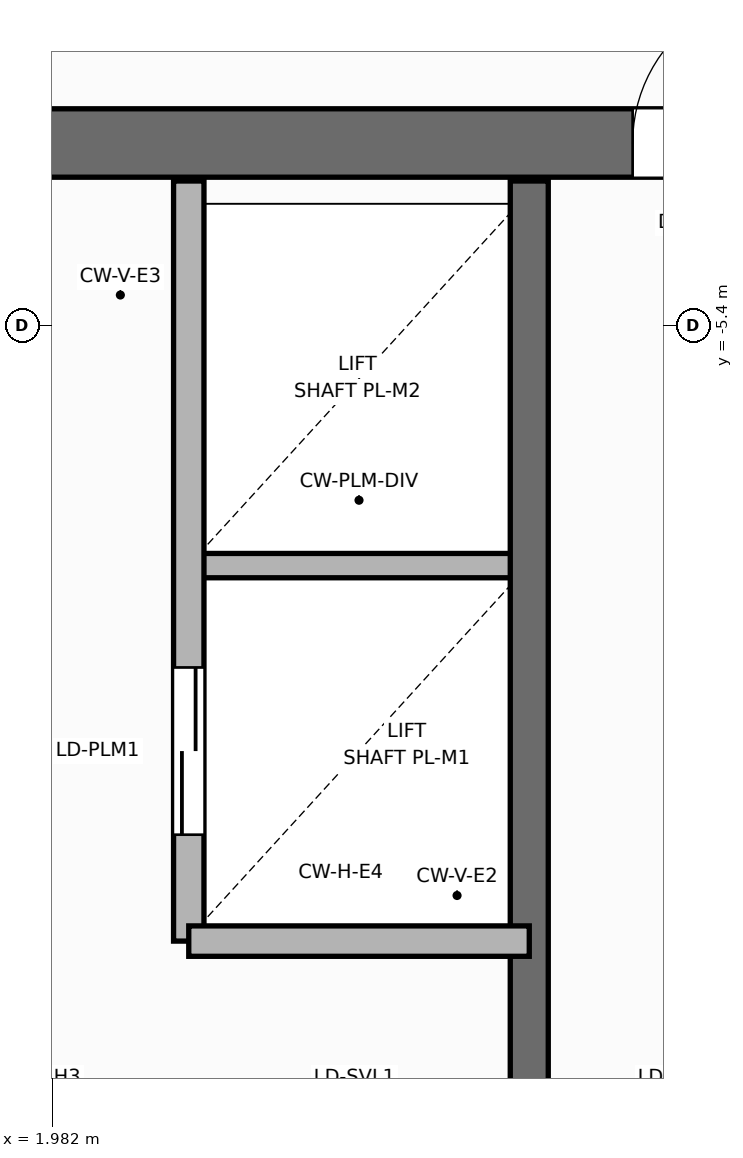
"""IFC4 building model, lengths in metres.
Left out: names, types, materials, properties, quantities, classifications, styles, units other than length and angle.
Written with IfcOpenShell. Run it as: python <this file> out.ifc"""

import sys

from ifc_helpers import new_model, si_unit, direction, frame, frame_2d, origin, place, context, subcontext, project, spatial, rectangle, extrude, element, fill, save


model = new_model("IFC4")
c1 = context("Model", 3, precision=1e-05, world=origin(), true_north=direction((0.0, 1.0)))
c2 = subcontext(c1, "Body", "Model", "MODEL_VIEW")
j1 = project(units=[si_unit("LENGTHUNIT", "METRE"), si_unit("PLANEANGLEUNIT", "RADIAN")], contexts=[c1])
p1 = place(None, origin())
s1 = spatial("IfcSite", under=j1, at=p1, CompositionType="ELEMENT")
p2 = place(p1, origin())
s2 = spatial("IfcBuilding", under=s1, at=p2, CompositionType="ELEMENT")
p3 = place(p2, frame((0.0, 0.0, 90.0)))
s3 = spatial("IfcBuildingStorey", under=s2, at=p3, CompositionType="ELEMENT", Elevation=90.0)
p4 = place(p3, frame((2.88, -6.98, 0.0), z_axis=(0.0, 0.0, 1.0), x_axis=(1.0, 0.0, 0.0)))
e1 = element("IfcWall", 1, at=p4, inside=s3, PredefinedType="PARTITIONING", context=c2, shape_type="SweptSolid", body=[
    extrude(rectangle(XDim=2.24, YDim=0.16, at=frame_2d((1.12, 0.0))), origin(), (0.0, 0.0, 1.0), 4.52),
])
p5 = place(p3, frame((-12.65, -4.2, 0.0), z_axis=(0.0, 0.0, 1.0), x_axis=(1.0, 0.0, 0.0)))
e2 = element("IfcWall", 2, at=p5, inside=s3, PredefinedType="SHEAR", context=c2, shape_type="SweptSolid", body=[
    extrude(rectangle(XDim=25.3, YDim=0.45, at=frame_2d((12.65, 0.0))), origin(), (0.0, 0.0, 1.0), 4.8),
])
p6 = place(p5, frame((0.95, 0.0, 0.0)))
e3 = element("IfcOpeningElement", 3, at=p6, cuts=e2, PredefinedType="OPENING", context=c2, shape_type="SweptSolid", body=[
    extrude(rectangle(XDim=0.756, YDim=2.054, at=frame_2d((0.375, 1.027))), frame((0.0, 0.235, 0.0), z_axis=(0.0, -1.0, 0.0), x_axis=(1.0, 0.0, 0.0)), (0.0, 0.0, 1.0), 0.47),
])
p7 = place(p5, frame((2.6, 0.0, 0.0)))
e4 = element("IfcOpeningElement", 4, at=p7, cuts=e2, PredefinedType="OPENING", context=c2, shape_type="SweptSolid", body=[
    extrude(rectangle(XDim=0.756, YDim=2.054, at=frame_2d((0.375, 1.027))), frame((0.0, 0.235, 0.0), z_axis=(0.0, -1.0, 0.0), x_axis=(1.0, 0.0, 0.0)), (0.0, 0.0, 1.0), 0.47),
])
p8 = place(p5, frame((21.85, 0.0, 0.0)))
e5 = element("IfcOpeningElement", 5, at=p8, cuts=e2, PredefinedType="OPENING", context=c2, shape_type="SweptSolid", body=[
    extrude(rectangle(XDim=0.756, YDim=2.054, at=frame_2d((0.375, 1.027))), frame((0.0, 0.235, 0.0), z_axis=(0.0, -1.0, 0.0), x_axis=(1.0, 0.0, 0.0)), (0.0, 0.0, 1.0), 0.47),
])
p9 = place(p5, frame((23.5, 0.0, 0.0)))
e6 = element("IfcOpeningElement", 6, at=p9, cuts=e2, PredefinedType="OPENING", context=c2, shape_type="SweptSolid", body=[
    extrude(rectangle(XDim=0.756, YDim=2.054, at=frame_2d((0.375, 1.027))), frame((0.0, 0.235, 0.0), z_axis=(0.0, -1.0, 0.0), x_axis=(1.0, 0.0, 0.0)), (0.0, 0.0, 1.0), 0.47),
])
p10 = place(p5, frame((5.85, 0.0, 0.0)))
e7 = element("IfcOpeningElement", 7, at=p10, cuts=e2, PredefinedType="OPENING", context=c2, shape_type="SweptSolid", body=[
    extrude(rectangle(XDim=1.006, YDim=2.104, at=frame_2d((0.5, 1.052))), frame((0.0, 0.235, 0.0), z_axis=(0.0, -1.0, 0.0), x_axis=(1.0, 0.0, 0.0)), (0.0, 0.0, 1.0), 0.47),
])
p11 = place(p5, frame((10.35, 0.0, 0.0)))
e8 = element("IfcOpeningElement", 8, at=p11, cuts=e2, PredefinedType="OPENING", context=c2, shape_type="SweptSolid", body=[
    extrude(rectangle(XDim=1.406, YDim=2.154, at=frame_2d((0.7, 1.077))), frame((0.0, 0.235, 0.0), z_axis=(0.0, -1.0, 0.0), x_axis=(1.0, 0.0, 0.0)), (0.0, 0.0, 1.0), 0.47),
])
p12 = place(p5, frame((18.45, 0.0, 0.0)))
e9 = element("IfcOpeningElement", 9, at=p12, cuts=e2, PredefinedType="OPENING", context=c2, shape_type="SweptSolid", body=[
    extrude(rectangle(XDim=1.006, YDim=2.104, at=frame_2d((0.5, 1.052))), frame((0.0, 0.235, 0.0), z_axis=(0.0, -1.0, 0.0), x_axis=(1.0, 0.0, 0.0)), (0.0, 0.0, 1.0), 0.47),
])
p13 = place(p3, frame((5.12, -13.85, 0.0), z_axis=(0.0, 0.0, 1.0), x_axis=(0.0, 1.0, 0.0)))
e10 = element("IfcWall", 10, at=p13, inside=s3, PredefinedType="SHEAR", context=c2, shape_type="SweptSolid", body=[
    extrude(rectangle(XDim=9.4, YDim=0.25, at=frame_2d((4.7, 0.0))), origin(), (0.0, 0.0, 1.0), 4.8),
])
p14 = place(p3, frame((2.88, -9.45, 0.0), z_axis=(0.0, 0.0, 1.0), x_axis=(0.0, 1.0, 0.0)))
e11 = element("IfcWall", 11, at=p14, inside=s3, PredefinedType="SOLIDWALL", context=c2, shape_type="SweptSolid", body=[
    extrude(rectangle(XDim=5.0, YDim=0.2, at=frame_2d((2.5, 0.0))), origin(), (0.0, 0.0, 1.0), 4.52),
])
p15 = place(p14, frame((0.7, 0.0, 0.0)))
e12 = element("IfcOpeningElement", 12, at=p15, cuts=e11, PredefinedType="OPENING", context=c2, shape_type="SweptSolid", body=[
    extrude(rectangle(XDim=1.106, YDim=2.104, at=frame_2d((0.55, 1.052))), frame((0.0, 0.11, 0.0), z_axis=(0.0, -1.0, 0.0), x_axis=(1.0, 0.0, 0.0)), (0.0, 0.0, 1.0), 0.22),
])
p16 = place(p3, frame((2.88, -9.45, 0.0), z_axis=(0.0, 0.0, 1.0), x_axis=(1.0, 0.0, 0.0)))
e13 = element("IfcWall", 13, at=p16, inside=s3, PredefinedType="SOLIDWALL", context=c2, shape_type="SweptSolid", body=[
    extrude(rectangle(XDim=2.24, YDim=0.2, at=frame_2d((1.12, 0.0))), origin(), (0.0, 0.0, 1.0), 4.52),
])
p17 = place(p15, origin())
e14 = element("IfcDoor", 14, at=p17, inside=s3, OperationType="DOUBLE_DOOR_SLIDING", PredefinedType="DOOR", context=c2, shape_type="SweptSolid", body=[
    extrude(rectangle(XDim=1.1, YDim=2.1, at=frame_2d((0.55, 1.05))), frame((0.0, 0.025, 0.0), z_axis=(0.0, -1.0, 0.0), x_axis=(1.0, 0.0, 0.0)), (0.0, 0.0, 1.0), 0.05),
])
fill(e12, e14)
p18 = place(p12, origin())
e15 = element("IfcDoor", 15, at=p18, inside=s3, OperationType="SINGLE_SWING_RIGHT", PredefinedType="DOOR", context=c2, shape_type="SweptSolid", body=[
    extrude(rectangle(XDim=1.0, YDim=2.1, at=frame_2d((0.5, 1.05))), frame((0.0, 0.025, 0.0), z_axis=(0.0, -1.0, 0.0), x_axis=(1.0, 0.0, 0.0)), (0.0, 0.0, 1.0), 0.05),
])
fill(e9, e15)
save(model, sys.argv[1])
